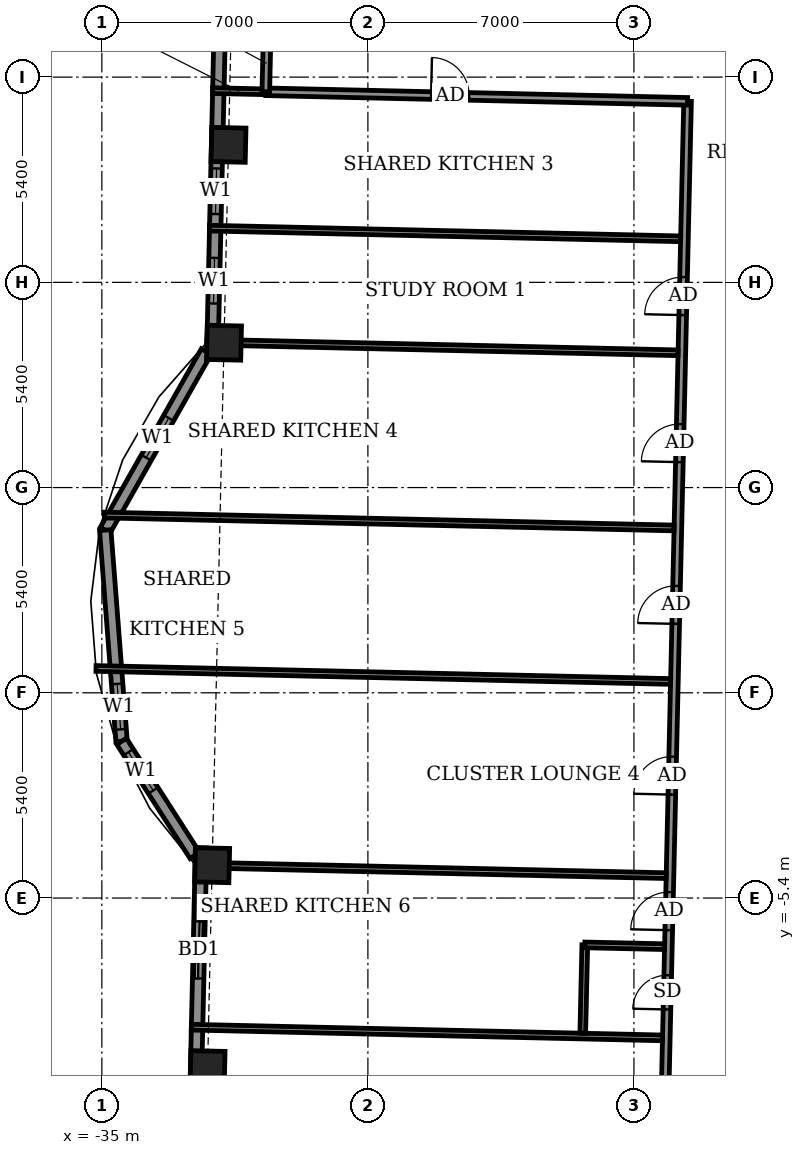
"""IFC4 building model, lengths in metres.
Left out: names, types, materials, properties, quantities, classifications, styles, units other than length and angle.
Written with IfcOpenShell. Run it as: python <this file> out.ifc"""

import sys

from ifc_helpers import new_model, si_unit, direction, frame, frame_2d, origin, origin_2d, place, context, subcontext, project, spatial, rectangle, extrude, element, fill, save


model = new_model("IFC4")
c1 = context("Model", 3, precision=1e-05, world=origin(), true_north=direction((0.0, 1.0)))
c2 = subcontext(c1, "Body", "Model", "MODEL_VIEW")
j1 = project(units=[si_unit("LENGTHUNIT", "METRE"), si_unit("PLANEANGLEUNIT", "RADIAN")], contexts=[c1])
p1 = place(None, origin())
s1 = spatial("IfcSite", under=j1, at=p1, CompositionType="ELEMENT")
p2 = place(p1, origin())
s2 = spatial("IfcBuilding", under=s1, at=p2, CompositionType="ELEMENT")
p3 = place(p2, frame((0.0, 0.0, 306.1)))
s3 = spatial("IfcBuildingStorey", under=s2, at=p3, CompositionType="ELEMENT", Elevation=306.1)
for number, where, z_axis, x_axis in (
    (1, (-32.098, -4.535, -0.55), (0.0, 0.0, 1.0), (-0.023, -1.0, 0.0)),
    (2, (-32.219, -9.875, -0.55), (0.0, 0.0, 1.0), (-0.023, -1.0, 0.0)),
    (3, (-31.668, 14.419, -0.55), (0.0, 0.0, 1.0), (-0.023, -1.0, 0.0)),
    (4, (-31.786, 9.212, -0.55), (0.0, 0.0, 1.0), (-0.023, -1.0, 0.0)),
):
    element("IfcColumn", number, at=place(p3, frame(where, z_axis=z_axis, x_axis=x_axis)), inside=s3, PredefinedType="COLUMN", context=c2, shape_type="SweptSolid", body=[
        extrude(rectangle(XDim=0.9, YDim=0.9, at=origin_2d()), origin(), (0.0, 0.0, 1.0), 3.6),
    ])
p4 = place(p3, frame((-31.735, 24.69, 0.0), z_axis=(0.0, 0.0, 1.0), x_axis=(-0.022658721334, -0.999743258216, 0.0)))
e5 = element("IfcWall", 5, at=p4, inside=s3, PredefinedType="SOLIDWALL", context=c2, shape_type="SweptSolid", body=[
    extrude(rectangle(XDim=15.925, YDim=0.3, at=frame_2d((7.962, 0.0))), origin(), (0.0, 0.0, 1.0), 2.55),
])
p5 = place(p4, frame((1.953, 0.0, 0.0)))
e6 = element("IfcOpeningElement", 6, at=p5, cuts=e5, PredefinedType="OPENING", context=c2, shape_type="SweptSolid", body=[
    extrude(rectangle(XDim=1.5, YDim=2.4, at=frame_2d((0.75, 1.2))), frame((0.0, 0.16, 0.0), z_axis=(0.0, -1.0, 0.0), x_axis=(1.0, 0.0, 0.0)), (0.0, 0.0, 1.0), 0.32),
])
p6 = place(p4, frame((10.896, 0.0, 0.9)))
e7 = element("IfcOpeningElement", 7, at=p6, cuts=e5, PredefinedType="OPENING", context=c2, shape_type="SweptSolid", body=[
    extrude(rectangle(XDim=1.2, YDim=1.5, at=frame_2d((0.6, 0.75))), frame((0.0, 0.16, 0.0), z_axis=(0.0, -1.0, 0.0), x_axis=(1.0, 0.0, 0.0)), (0.0, 0.0, 1.0), 0.32),
])
p7 = place(p4, frame((13.25, 0.0, 0.9)))
e8 = element("IfcOpeningElement", 8, at=p7, cuts=e5, PredefinedType="OPENING", context=c2, shape_type="SweptSolid", body=[
    extrude(rectangle(XDim=1.2, YDim=1.5, at=frame_2d((0.6, 0.75))), frame((0.0, 0.16, 0.0), z_axis=(0.0, -1.0, 0.0), x_axis=(1.0, 0.0, 0.0)), (0.0, 0.0, 1.0), 0.32),
])
p8 = place(p3, frame((-32.252, 8.978, 0.0), z_axis=(0.0, 0.0, 1.0), x_axis=(-0.492554919955, -0.870281363025, 0.0)))
e9 = element("IfcWall", 9, at=p8, inside=s3, PredefinedType="SOLIDWALL", context=c2, shape_type="SweptSolid", body=[
    extrude(rectangle(XDim=5.398, YDim=0.3, at=frame_2d((2.699, 0.0))), origin(), (0.0, 0.0, 1.0), 3.05),
])
p9 = place(p8, frame((2.008, 0.0, 0.9)))
e10 = element("IfcOpeningElement", 10, at=p9, cuts=e9, PredefinedType="OPENING", context=c2, shape_type="SweptSolid", body=[
    extrude(rectangle(XDim=1.2, YDim=1.5, at=frame_2d((0.6, 0.75))), frame((0.0, 0.16, 0.0), z_axis=(0.0, -1.0, 0.0), x_axis=(1.0, 0.0, 0.0)), (0.0, 0.0, 1.0), 0.32),
])
p10 = place(p3, frame((-34.911, 4.28, 0.0), z_axis=(0.0, 0.0, 1.0), x_axis=(0.077135284219, -0.997020635658, 0.0)))
e11 = element("IfcWall", 11, at=p10, inside=s3, PredefinedType="SOLIDWALL", context=c2, shape_type="SweptSolid", body=[
    extrude(rectangle(XDim=5.574, YDim=0.3, at=frame_2d((2.787, 0.0))), origin(), (0.0, 0.0, 1.0), 3.05),
])
p11 = place(p10, frame((4.058, 0.0, 0.9)))
e12 = element("IfcOpeningElement", 12, at=p11, cuts=e11, PredefinedType="OPENING", context=c2, shape_type="SweptSolid", body=[
    extrude(rectangle(XDim=1.2, YDim=1.5, at=frame_2d((0.6, 0.75))), frame((0.0, 0.16, 0.0), z_axis=(0.0, -1.0, 0.0), x_axis=(1.0, 0.0, 0.0)), (0.0, 0.0, 1.0), 0.32),
])
p12 = place(p3, frame((-34.481, -1.277, 0.0), z_axis=(0.0, 0.0, 1.0), x_axis=(0.540460234606, -0.841369558999, 0.0)))
e13 = element("IfcWall", 13, at=p12, inside=s3, PredefinedType="SOLIDWALL", context=c2, shape_type="SweptSolid", body=[
    extrude(rectangle(XDim=3.569, YDim=0.3, at=frame_2d((1.785, 0.0))), origin(), (0.0, 0.0, 1.0), 3.05),
])
p13 = place(p12, frame((0.338, 0.0, 0.9)))
e14 = element("IfcOpeningElement", 14, at=p13, cuts=e13, PredefinedType="OPENING", context=c2, shape_type="SweptSolid", body=[
    extrude(rectangle(XDim=1.2, YDim=1.5, at=frame_2d((0.6, 0.75))), frame((0.0, 0.16, 0.0), z_axis=(0.0, -1.0, 0.0), x_axis=(1.0, 0.0, 0.0)), (0.0, 0.0, 1.0), 0.32),
])
p14 = place(p3, frame((-32.388, -4.079, 0.0), z_axis=(0.0, 0.0, 1.0), x_axis=(-0.022673163436, -0.999742930788, 0.0)))
e15 = element("IfcWall", 15, at=p14, inside=s3, PredefinedType="SOLIDWALL", context=c2, shape_type="SweptSolid", body=[
    extrude(rectangle(XDim=16.324, YDim=0.3, at=frame_2d((8.162, 0.0))), origin(), (0.0, 0.0, 1.0), 2.55),
])
p15 = place(p14, frame((1.937, 0.0, 0.0)))
e16 = element("IfcOpeningElement", 16, at=p15, cuts=e15, PredefinedType="OPENING", context=c2, shape_type="SweptSolid", body=[
    extrude(rectangle(XDim=1.5, YDim=2.4, at=frame_2d((0.75, 1.2))), frame((0.0, 0.16, 0.0), z_axis=(0.0, -1.0, 0.0), x_axis=(1.0, 0.0, 0.0)), (0.0, 0.0, 1.0), 0.32),
])
p16 = place(p14, frame((6.433, 0.0, 0.9)))
e17 = element("IfcOpeningElement", 17, at=p16, cuts=e15, PredefinedType="OPENING", context=c2, shape_type="SweptSolid", body=[
    extrude(rectangle(XDim=0.9, YDim=1.5, at=frame_2d((0.45, 0.75))), frame((0.0, 0.16, 0.0), z_axis=(0.0, -1.0, 0.0), x_axis=(1.0, 0.0, 0.0)), (0.0, 0.0, 1.0), 0.32),
])
p17 = place(p14, frame((12.364, 0.0, 0.9)))
e18 = element("IfcOpeningElement", 18, at=p17, cuts=e15, PredefinedType="OPENING", context=c2, shape_type="SweptSolid", body=[
    extrude(rectangle(XDim=2.4, YDim=1.5, at=frame_2d((1.2, 0.75))), frame((0.0, 0.16, 0.0), z_axis=(0.0, -1.0, 0.0), x_axis=(1.0, 0.0, 0.0)), (0.0, 0.0, 1.0), 0.32),
])
p18 = place(p3, frame((-20.216, -12.081, 0.0), z_axis=(0.0, 0.0, 1.0), x_axis=(0.02267447203, 0.999742901109, 0.0)))
e19 = element("IfcWall", 19, at=p18, inside=s3, PredefinedType="PARTITIONING", context=c2, shape_type="SweptSolid", body=[
    extrude(rectangle(XDim=27.65, YDim=0.2, at=frame_2d((13.825, 0.0))), origin(), (0.0, 0.0, 1.0), 3.05),
])
p19 = place(p18, frame((22.025, 0.0, 0.0)))
e20 = element("IfcOpeningElement", 20, at=p19, cuts=e19, PredefinedType="OPENING", context=c2, shape_type="SweptSolid", body=[
    extrude(rectangle(XDim=1.0, YDim=2.1, at=frame_2d((0.5, 1.05))), frame((0.0, 0.11, 0.0), z_axis=(0.0, -1.0, 0.0), x_axis=(1.0, 0.0, 0.0)), (0.0, 0.0, 1.0), 0.22),
])
p20 = place(p18, frame((18.155, 0.0, 0.0)))
e21 = element("IfcOpeningElement", 21, at=p20, cuts=e19, PredefinedType="OPENING", context=c2, shape_type="SweptSolid", body=[
    extrude(rectangle(XDim=1.0, YDim=2.1, at=frame_2d((0.5, 1.05))), frame((0.0, 0.11, 0.0), z_axis=(0.0, -1.0, 0.0), x_axis=(1.0, 0.0, 0.0)), (0.0, 0.0, 1.0), 0.22),
])
p21 = place(p18, frame((13.898, 0.0, 0.0)))
e22 = element("IfcOpeningElement", 22, at=p21, cuts=e19, PredefinedType="OPENING", context=c2, shape_type="SweptSolid", body=[
    extrude(rectangle(XDim=1.0, YDim=2.1, at=frame_2d((0.5, 1.05))), frame((0.0, 0.11, 0.0), z_axis=(0.0, -1.0, 0.0), x_axis=(1.0, 0.0, 0.0)), (0.0, 0.0, 1.0), 0.22),
])
p22 = place(p18, frame((9.405, 0.0, 0.0)))
e23 = element("IfcOpeningElement", 23, at=p22, cuts=e19, PredefinedType="OPENING", context=c2, shape_type="SweptSolid", body=[
    extrude(rectangle(XDim=1.0, YDim=2.1, at=frame_2d((0.5, 1.05))), frame((0.0, 0.11, 0.0), z_axis=(0.0, -1.0, 0.0), x_axis=(1.0, 0.0, 0.0)), (0.0, 0.0, 1.0), 0.22),
])
p23 = place(p18, frame((5.837, 0.0, 0.0)))
e24 = element("IfcOpeningElement", 24, at=p23, cuts=e19, PredefinedType="OPENING", context=c2, shape_type="SweptSolid", body=[
    extrude(rectangle(XDim=1.0, YDim=2.1, at=frame_2d((0.5, 1.05))), frame((0.0, 0.11, 0.0), z_axis=(0.0, -1.0, 0.0), x_axis=(1.0, 0.0, 0.0)), (0.0, 0.0, 1.0), 0.22),
])
p24 = place(p18, frame((3.75, 0.0, 0.0)))
e25 = element("IfcOpeningElement", 25, at=p24, cuts=e19, PredefinedType="OPENING", context=c2, shape_type="SweptSolid", body=[
    extrude(rectangle(XDim=0.9, YDim=2.1, at=frame_2d((0.45, 1.05))), frame((0.0, 0.11, 0.0), z_axis=(0.0, -1.0, 0.0), x_axis=(1.0, 0.0, 0.0)), (0.0, 0.0, 1.0), 0.22),
])
p25 = place(p3, frame((-32.645, -8.798, 0.0), z_axis=(0.0, 0.0, 1.0), x_axis=(0.999741408463, -0.022740189192, 0.0)))
e26 = element("IfcWall", 26, at=p25, inside=s3, PredefinedType="PARTITIONING", context=c2, shape_type="SweptSolid", body=[
    extrude(rectangle(XDim=12.4, YDim=0.15, at=frame_2d((6.2, 0.0))), origin(), (0.0, 0.0, 1.0), 2.55),
])
p26 = place(p3, frame((-22.346, -8.957, 0.0), z_axis=(0.0, 0.0, 1.0), x_axis=(0.02279059109, 0.999740260747, 0.0)))
e27 = element("IfcWall", 27, at=p26, inside=s3, PredefinedType="PARTITIONING", context=c2, shape_type="SweptSolid", body=[
    extrude(rectangle(XDim=2.324, YDim=0.15, at=frame_2d((1.162, 0.0))), origin(), (0.0, 0.0, 1.0), 3.05),
])
p27 = place(p3, frame((-22.293, -6.633, 0.0), z_axis=(0.0, 0.0, 1.0), x_axis=(0.999750703499, -0.022327804475, 0.0)))
e28 = element("IfcWall", 28, at=p27, inside=s3, PredefinedType="PARTITIONING", context=c2, shape_type="SweptSolid", body=[
    extrude(rectangle(XDim=2.099, YDim=0.15, at=frame_2d((1.05, 0.0))), origin(), (0.0, 0.0, 1.0), 3.05),
])
p28 = place(p3, frame((-32.248, -4.536, 0.0), z_axis=(0.0, 0.0, 1.0), x_axis=(0.999741439573, -0.022738821441, 0.0)))
e29 = element("IfcWall", 29, at=p28, inside=s3, PredefinedType="PARTITIONING", context=c2, shape_type="SweptSolid", body=[
    extrude(rectangle(XDim=12.1, YDim=0.15, at=frame_2d((6.05, 0.0))), origin(), (0.0, 0.0, 1.0), 3.05),
])
p29 = place(p3, frame((-35.154, 0.641, 0.0), z_axis=(0.0, 0.0, 1.0), x_axis=(0.99974273487, -0.022681800518, 0.0)))
e30 = element("IfcWall", 30, at=p29, inside=s3, PredefinedType="PARTITIONING", context=c2, shape_type="SweptSolid", body=[
    extrude(rectangle(XDim=15.123, YDim=0.15, at=frame_2d((7.562, 0.0))), origin(), (0.0, 0.0, 1.0), 2.1),
])
p30 = place(p3, frame((-34.934, 4.677, 0.0), z_axis=(0.0, 0.0, 1.0), x_axis=(0.99974273422, -0.022681829163, 0.0)))
e31 = element("IfcWall", 31, at=p30, inside=s3, PredefinedType="PARTITIONING", context=c2, shape_type="SweptSolid", body=[
    extrude(rectangle(XDim=14.994, YDim=0.15, at=frame_2d((7.497, 0.0))), origin(), (0.0, 0.0, 1.0), 2.1),
])
p31 = place(p3, frame((-32.236, 9.227, 0.0), z_axis=(0.0, 0.0, 1.0), x_axis=(0.999743195783, -0.022661475803, 0.0)))
e32 = element("IfcWall", 32, at=p31, inside=s3, PredefinedType="PARTITIONING", context=c2, shape_type="SweptSolid", body=[
    extrude(rectangle(XDim=12.4, YDim=0.15, at=frame_2d((6.2, 0.0))), origin(), (0.0, 0.0, 1.0), 3.05),
])
p32 = place(p3, frame((-32.168, 12.226, 0.0), z_axis=(0.0, 0.0, 1.0), x_axis=(0.999743195783, -0.022661475803, 0.0)))
e33 = element("IfcWall", 33, at=p32, inside=s3, PredefinedType="PARTITIONING", context=c2, shape_type="SweptSolid", body=[
    extrude(rectangle(XDim=12.4, YDim=0.15, at=frame_2d((6.2, 0.0))), origin(), (0.0, 0.0, 1.0), 2.55),
])
p33 = place(p3, frame((-32.086, 15.845, 0.0), z_axis=(0.0, 0.0, 1.0), x_axis=(0.999740667531, -0.022772739949, 0.0)))
e34 = element("IfcWall", 34, at=p33, inside=s3, PredefinedType="PARTITIONING", context=c2, shape_type="SweptSolid", body=[
    extrude(rectangle(XDim=1.404, YDim=0.15, at=frame_2d((0.702, 0.0))), origin(), (0.0, 0.0, 1.0), 2.55),
])
p34 = place(p3, frame((-30.686, 15.814, 0.0), z_axis=(0.0, 0.0, 1.0), x_axis=(0.999742346277, -0.022698921993, 0.0)))
e35 = element("IfcWall", 35, at=p34, inside=s3, PredefinedType="PARTITIONING", context=c2, shape_type="SweptSolid", body=[
    extrude(rectangle(XDim=11.1, YDim=0.2, at=frame_2d((5.55, 0.0))), origin(), (0.0, 0.0, 1.0), 3.05),
])
p35 = place(p34, frame((4.35, 0.0, 0.0)))
e36 = element("IfcOpeningElement", 36, at=p35, cuts=e35, PredefinedType="OPENING", context=c2, shape_type="SweptSolid", body=[
    extrude(rectangle(XDim=1.0, YDim=2.1, at=frame_2d((0.5, 1.05))), frame((0.0, 0.11, 0.0), z_axis=(0.0, -1.0, 0.0), x_axis=(1.0, 0.0, 0.0)), (0.0, 0.0, 1.0), 0.22),
])
p36 = place(p3, frame((-30.686, 15.814, 0.0), z_axis=(0.0, 0.0, 1.0), x_axis=(0.022632637625, 0.99974384905, 0.0)))
e37 = element("IfcWall", 37, at=p36, inside=s3, PredefinedType="PARTITIONING", context=c2, shape_type="SweptSolid", body=[
    extrude(rectangle(XDim=1.5, YDim=0.2, at=frame_2d((0.75, 0.0))), origin(), (0.0, 0.0, 1.0), 3.05),
])
p37 = place(p3, frame((-30.652, 17.313, 0.0), z_axis=(0.0, 0.0, 1.0), x_axis=(0.999742623764, -0.02268669719, 0.0)))
e38 = element("IfcWall", 38, at=p37, inside=s3, PredefinedType="PARTITIONING", context=c2, shape_type="SweptSolid", body=[
    extrude(rectangle(XDim=58.8, YDim=0.2, at=frame_2d((29.4, 0.0))), origin(), (0.0, 0.0, 1.0), 3.05),
])
p38 = place(p37, frame((54.601, 0.0, 0.0)))
e39 = element("IfcOpeningElement", 39, at=p38, cuts=e38, PredefinedType="OPENING", context=c2, shape_type="SweptSolid", body=[
    extrude(rectangle(XDim=1.0, YDim=2.1, at=frame_2d((0.5, 1.05))), frame((0.0, 0.11, 0.0), z_axis=(0.0, -1.0, 0.0), x_axis=(1.0, 0.0, 0.0)), (0.0, 0.0, 1.0), 0.22),
])
p39 = place(p37, frame((49.35, 0.0, 0.0)))
e40 = element("IfcOpeningElement", 40, at=p39, cuts=e38, PredefinedType="OPENING", context=c2, shape_type="SweptSolid", body=[
    extrude(rectangle(XDim=0.9, YDim=2.1, at=frame_2d((0.45, 1.05))), frame((0.0, 0.11, 0.0), z_axis=(0.0, -1.0, 0.0), x_axis=(1.0, 0.0, 0.0)), (0.0, 0.0, 1.0), 0.22),
])
p40 = place(p37, frame((42.55, 0.0, 0.0)))
e41 = element("IfcOpeningElement", 41, at=p40, cuts=e38, PredefinedType="OPENING", context=c2, shape_type="SweptSolid", body=[
    extrude(rectangle(XDim=0.9, YDim=2.1, at=frame_2d((0.45, 1.05))), frame((0.0, 0.11, 0.0), z_axis=(0.0, -1.0, 0.0), x_axis=(1.0, 0.0, 0.0)), (0.0, 0.0, 1.0), 0.22),
])
p41 = place(p37, frame((40.475, 0.0, 0.0)))
e42 = element("IfcOpeningElement", 42, at=p41, cuts=e38, PredefinedType="OPENING", context=c2, shape_type="SweptSolid", body=[
    extrude(rectangle(XDim=0.9, YDim=2.1, at=frame_2d((0.45, 1.05))), frame((0.0, 0.11, 0.0), z_axis=(0.0, -1.0, 0.0), x_axis=(1.0, 0.0, 0.0)), (0.0, 0.0, 1.0), 0.22),
])
p42 = place(p37, frame((33.6, 0.0, 0.0)))
e43 = element("IfcOpeningElement", 43, at=p42, cuts=e38, PredefinedType="OPENING", context=c2, shape_type="SweptSolid", body=[
    extrude(rectangle(XDim=0.9, YDim=2.1, at=frame_2d((0.45, 1.05))), frame((0.0, 0.11, 0.0), z_axis=(0.0, -1.0, 0.0), x_axis=(1.0, 0.0, 0.0)), (0.0, 0.0, 1.0), 0.22),
])
p43 = place(p37, frame((31.55, 0.0, 0.0)))
e44 = element("IfcOpeningElement", 44, at=p43, cuts=e38, PredefinedType="OPENING", context=c2, shape_type="SweptSolid", body=[
    extrude(rectangle(XDim=0.9, YDim=2.1, at=frame_2d((0.45, 1.05))), frame((0.0, 0.11, 0.0), z_axis=(0.0, -1.0, 0.0), x_axis=(1.0, 0.0, 0.0)), (0.0, 0.0, 1.0), 0.22),
])
p44 = place(p37, frame((24.425, 0.0, 0.0)))
e45 = element("IfcOpeningElement", 45, at=p44, cuts=e38, PredefinedType="OPENING", context=c2, shape_type="SweptSolid", body=[
    extrude(rectangle(XDim=0.9, YDim=2.1, at=frame_2d((0.45, 1.05))), frame((0.0, 0.11, 0.0), z_axis=(0.0, -1.0, 0.0), x_axis=(1.0, 0.0, 0.0)), (0.0, 0.0, 1.0), 0.22),
])
p45 = place(p37, frame((22.05, 0.0, 0.0)))
e46 = element("IfcOpeningElement", 46, at=p45, cuts=e38, PredefinedType="OPENING", context=c2, shape_type="SweptSolid", body=[
    extrude(rectangle(XDim=0.9, YDim=2.1, at=frame_2d((0.45, 1.05))), frame((0.0, 0.11, 0.0), z_axis=(0.0, -1.0, 0.0), x_axis=(1.0, 0.0, 0.0)), (0.0, 0.0, 1.0), 0.22),
])
p46 = place(p37, frame((14.95, 0.0, 0.0)))
e47 = element("IfcOpeningElement", 47, at=p46, cuts=e38, PredefinedType="OPENING", context=c2, shape_type="SweptSolid", body=[
    extrude(rectangle(XDim=0.9, YDim=2.1, at=frame_2d((0.45, 1.05))), frame((0.0, 0.11, 0.0), z_axis=(0.0, -1.0, 0.0), x_axis=(1.0, 0.0, 0.0)), (0.0, 0.0, 1.0), 0.22),
])
p47 = place(p37, frame((12.525, 0.0, 0.0)))
e48 = element("IfcOpeningElement", 48, at=p47, cuts=e38, PredefinedType="OPENING", context=c2, shape_type="SweptSolid", body=[
    extrude(rectangle(XDim=0.9, YDim=2.1, at=frame_2d((0.45, 1.05))), frame((0.0, 0.11, 0.0), z_axis=(0.0, -1.0, 0.0), x_axis=(1.0, 0.0, 0.0)), (0.0, 0.0, 1.0), 0.22),
])
p48 = place(p37, frame((4.032, 0.0, 0.0)))
e49 = element("IfcOpeningElement", 49, at=p48, cuts=e38, PredefinedType="OPENING", context=c2, shape_type="SweptSolid", body=[
    extrude(rectangle(XDim=1.0, YDim=2.1, at=frame_2d((0.5, 1.05))), frame((0.0, 0.11, 0.0), z_axis=(0.0, -1.0, 0.0), x_axis=(1.0, 0.0, 0.0)), (0.0, 0.0, 1.0), 0.22),
])
p49 = place(p6, origin())
e50 = element("IfcWindow", 50, at=p49, inside=s3, PartitioningType="SINGLE_PANEL", PredefinedType="WINDOW", context=c2, shape_type="SweptSolid", body=[
    extrude(rectangle(XDim=1.2, YDim=1.5, at=frame_2d((0.6, 0.75))), frame((0.0, 0.03, 0.0), z_axis=(0.0, -1.0, 0.0), x_axis=(1.0, 0.0, 0.0)), (0.0, 0.0, 1.0), 0.06),
])
fill(e7, e50)
p50 = place(p7, origin())
e51 = element("IfcWindow", 51, at=p50, inside=s3, PartitioningType="SINGLE_PANEL", PredefinedType="WINDOW", context=c2, shape_type="SweptSolid", body=[
    extrude(rectangle(XDim=1.2, YDim=1.5, at=frame_2d((0.6, 0.75))), frame((0.0, 0.03, 0.0), z_axis=(0.0, -1.0, 0.0), x_axis=(1.0, 0.0, 0.0)), (0.0, 0.0, 1.0), 0.06),
])
fill(e8, e51)
p51 = place(p9, origin())
e52 = element("IfcWindow", 52, at=p51, inside=s3, PartitioningType="SINGLE_PANEL", PredefinedType="WINDOW", context=c2, shape_type="SweptSolid", body=[
    extrude(rectangle(XDim=1.2, YDim=1.5, at=frame_2d((0.6, 0.75))), frame((0.0, 0.03, 0.0), z_axis=(0.0, -1.0, 0.0), x_axis=(1.0, 0.0, 0.0)), (0.0, 0.0, 1.0), 0.06),
])
fill(e10, e52)
p52 = place(p11, origin())
e53 = element("IfcWindow", 53, at=p52, inside=s3, PartitioningType="SINGLE_PANEL", PredefinedType="WINDOW", context=c2, shape_type="SweptSolid", body=[
    extrude(rectangle(XDim=1.2, YDim=1.5, at=frame_2d((0.6, 0.75))), frame((0.0, 0.03, 0.0), z_axis=(0.0, -1.0, 0.0), x_axis=(1.0, 0.0, 0.0)), (0.0, 0.0, 1.0), 0.06),
])
fill(e12, e53)
p53 = place(p13, origin())
e54 = element("IfcWindow", 54, at=p53, inside=s3, PartitioningType="SINGLE_PANEL", PredefinedType="WINDOW", context=c2, shape_type="SweptSolid", body=[
    extrude(rectangle(XDim=1.2, YDim=1.5, at=frame_2d((0.6, 0.75))), frame((0.0, 0.03, 0.0), z_axis=(0.0, -1.0, 0.0), x_axis=(1.0, 0.0, 0.0)), (0.0, 0.0, 1.0), 0.06),
])
fill(e14, e54)
p54 = place(p15, origin())
e55 = element("IfcDoor", 55, at=p54, inside=s3, OperationType="SLIDING_TO_LEFT", PredefinedType="DOOR", context=c2, shape_type="SweptSolid", body=[
    extrude(rectangle(XDim=1.5, YDim=2.4, at=frame_2d((0.75, 1.2))), frame((0.0, 0.025, 0.0), z_axis=(0.0, -1.0, 0.0), x_axis=(1.0, 0.0, 0.0)), (0.0, 0.0, 1.0), 0.05),
])
fill(e16, e55)
p55 = place(p35, origin())
e56 = element("IfcDoor", 56, at=p55, inside=s3, OperationType="SINGLE_SWING_LEFT", PredefinedType="DOOR", context=c2, shape_type="SweptSolid", body=[
    extrude(rectangle(XDim=1.0, YDim=2.1, at=frame_2d((0.5, 1.05))), frame((0.0, 0.025, 0.0), z_axis=(0.0, -1.0, 0.0), x_axis=(1.0, 0.0, 0.0)), (0.0, 0.0, 1.0), 0.05),
])
fill(e36, e56)
p56 = place(p19, origin())
e57 = element("IfcDoor", 57, at=p56, inside=s3, OperationType="SINGLE_SWING_RIGHT", PredefinedType="DOOR", context=c2, shape_type="SweptSolid", body=[
    extrude(rectangle(XDim=1.0, YDim=2.1, at=frame_2d((0.5, 1.05))), frame((0.0, 0.025, 0.0), z_axis=(0.0, -1.0, 0.0), x_axis=(1.0, 0.0, 0.0)), (0.0, 0.0, 1.0), 0.05),
])
fill(e20, e57)
p57 = place(p20, origin())
e58 = element("IfcDoor", 58, at=p57, inside=s3, OperationType="SINGLE_SWING_LEFT", PredefinedType="DOOR", context=c2, shape_type="SweptSolid", body=[
    extrude(rectangle(XDim=1.0, YDim=2.1, at=frame_2d((0.5, 1.05))), frame((0.0, 0.025, 0.0), z_axis=(0.0, -1.0, 0.0), x_axis=(1.0, 0.0, 0.0)), (0.0, 0.0, 1.0), 0.05),
])
fill(e21, e58)
p58 = place(p21, origin())
e59 = element("IfcDoor", 59, at=p58, inside=s3, OperationType="SINGLE_SWING_RIGHT", PredefinedType="DOOR", context=c2, shape_type="SweptSolid", body=[
    extrude(rectangle(XDim=1.0, YDim=2.1, at=frame_2d((0.5, 1.05))), frame((0.0, 0.025, 0.0), z_axis=(0.0, -1.0, 0.0), x_axis=(1.0, 0.0, 0.0)), (0.0, 0.0, 1.0), 0.05),
])
fill(e22, e59)
p59 = place(p22, origin())
e60 = element("IfcDoor", 60, at=p59, inside=s3, OperationType="SINGLE_SWING_LEFT", PredefinedType="DOOR", context=c2, shape_type="SweptSolid", body=[
    extrude(rectangle(XDim=1.0, YDim=2.1, at=frame_2d((0.5, 1.05))), frame((0.0, 0.025, 0.0), z_axis=(0.0, -1.0, 0.0), x_axis=(1.0, 0.0, 0.0)), (0.0, 0.0, 1.0), 0.05),
])
fill(e23, e60)
p60 = place(p23, origin())
e61 = element("IfcDoor", 61, at=p60, inside=s3, OperationType="SINGLE_SWING_RIGHT", PredefinedType="DOOR", context=c2, shape_type="SweptSolid", body=[
    extrude(rectangle(XDim=1.0, YDim=2.1, at=frame_2d((0.5, 1.05))), frame((0.0, 0.025, 0.0), z_axis=(0.0, -1.0, 0.0), x_axis=(1.0, 0.0, 0.0)), (0.0, 0.0, 1.0), 0.05),
])
fill(e24, e61)
p61 = place(p24, origin())
e62 = element("IfcDoor", 62, at=p61, inside=s3, OperationType="SINGLE_SWING_LEFT", PredefinedType="DOOR", context=c2, shape_type="SweptSolid", body=[
    extrude(rectangle(XDim=0.9, YDim=2.1, at=frame_2d((0.45, 1.05))), frame((0.0, 0.025, 0.0), z_axis=(0.0, -1.0, 0.0), x_axis=(1.0, 0.0, 0.0)), (0.0, 0.0, 1.0), 0.05),
])
fill(e25, e62)
save(model, sys.argv[1])
